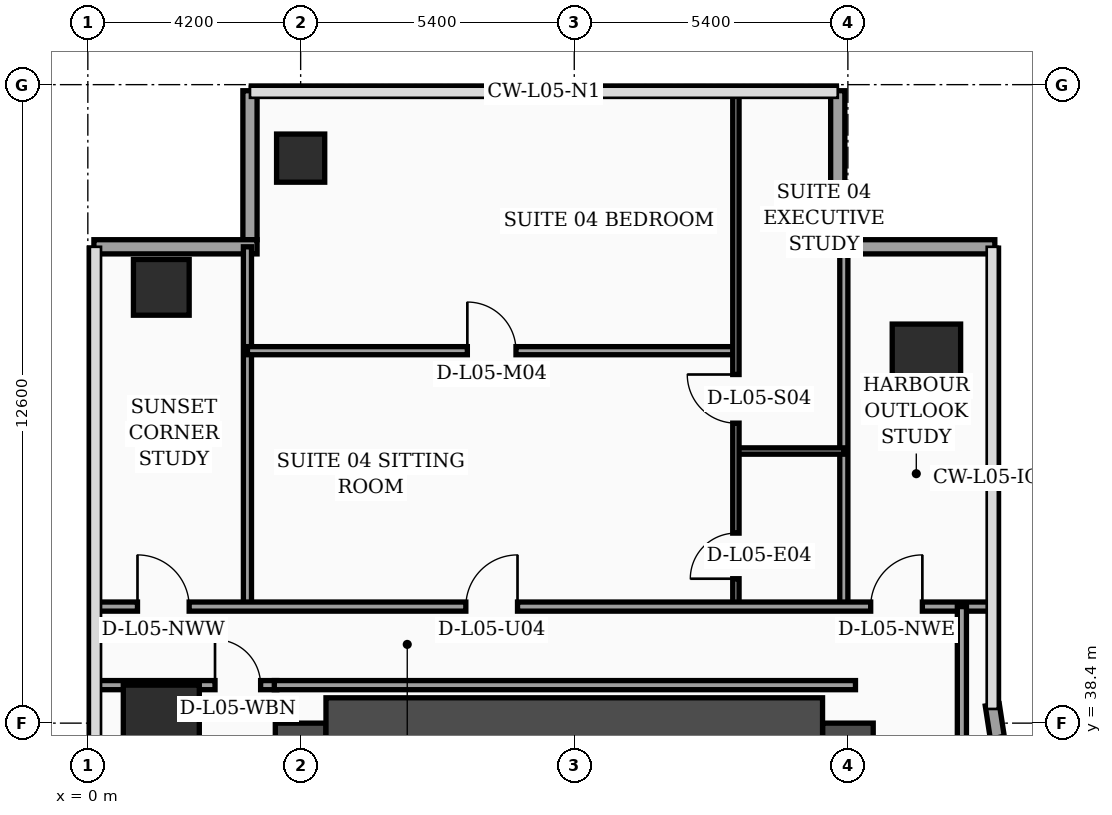
"""IFC4 building model, lengths in metres.
Left out: names, types, materials, properties, quantities, classifications, styles, units other than length and angle.
Written with IfcOpenShell. Run it as: python <this file> out.ifc"""

import sys

from ifc_helpers import new_model, si_unit, direction, frame, frame_2d, origin, origin_2d, place, context, subcontext, project, spatial, rectangle, hollow_rectangle, extrude, element, fill, save


model = new_model("IFC4")
c1 = context("Model", 3, precision=1e-05, world=origin(), true_north=direction((0.0, 1.0)))
c2 = subcontext(c1, "Body", "Model", "MODEL_VIEW")
j1 = project(units=[si_unit("LENGTHUNIT", "METRE"), si_unit("PLANEANGLEUNIT", "RADIAN")], contexts=[c1])
p1 = place(None, origin())
s1 = spatial("IfcSite", under=j1, at=p1, CompositionType="ELEMENT")
p2 = place(p1, origin())
s2 = spatial("IfcBuilding", under=s1, at=p2, CompositionType="ELEMENT")
p3 = place(p2, frame((0.0, 0.0, 27.0)))
s3 = spatial("IfcBuildingStorey", under=s2, at=p3, CompositionType="ELEMENT", Elevation=27.0)
p4 = place(p3, frame((4.2, 16.8, 0.0), z_axis=(0.0, 0.0, 1.0), x_axis=(0.0, 1.0, 0.0)))
e1 = element("IfcWall", 1, at=p4, inside=s3, PredefinedType="SHEAR", context=c2, shape_type="SweptSolid", body=[
    extrude(rectangle(XDim=21.6, YDim=1.0, at=frame_2d((10.8, 0.0))), origin(), (0.0, 0.0, 1.0), 3.56),
])
p5 = place(p3, frame((15.0, 16.8, 0.0), z_axis=(0.0, 0.0, 1.0), x_axis=(0.0, 1.0, 0.0)))
e2 = element("IfcWall", 2, at=p5, inside=s3, PredefinedType="SHEAR", context=c2, shape_type="SweptSolid", body=[
    extrude(rectangle(XDim=21.6, YDim=1.0, at=frame_2d((10.8, 0.0))), origin(), (0.0, 0.0, 1.0), 3.56),
])
p6 = place(p5, frame((8.65, 0.0, 0.0)))
e3 = element("IfcOpeningElement", 3, at=p6, cuts=e2, PredefinedType="OPENING", context=c2, shape_type="SweptSolid", body=[
    extrude(rectangle(XDim=1.1, YDim=2.2, at=frame_2d((0.55, 1.1))), frame((0.0, 0.51, 0.0), z_axis=(0.0, -1.0, 0.0), x_axis=(1.0, 0.0, 0.0)), (0.0, 0.0, 1.0), 1.02),
])
p7 = place(p5, frame((1.25, 0.0, 0.0)))
e4 = element("IfcOpeningElement", 4, at=p7, cuts=e2, PredefinedType="OPENING", context=c2, shape_type="SweptSolid", body=[
    extrude(rectangle(XDim=1.1, YDim=2.2, at=frame_2d((0.55, 1.1))), frame((0.0, 0.51, 0.0), z_axis=(0.0, -1.0, 0.0), x_axis=(1.0, 0.0, 0.0)), (0.0, 0.0, 1.0), 1.02),
])
p8 = place(p5, frame((3.8, 0.0, 0.0)))
e5 = element("IfcOpeningElement", 5, at=p8, cuts=e2, PredefinedType="OPENING", context=c2, shape_type="SweptSolid", body=[
    extrude(rectangle(XDim=1.1, YDim=2.2, at=frame_2d((0.55, 1.1))), frame((0.0, 0.51, 0.0), z_axis=(0.0, -1.0, 0.0), x_axis=(1.0, 0.0, 0.0)), (0.0, 0.0, 1.0), 1.02),
])
p9 = place(p5, frame((6.35, 0.0, 0.0)))
e6 = element("IfcOpeningElement", 6, at=p9, cuts=e2, PredefinedType="OPENING", context=c2, shape_type="SweptSolid", body=[
    extrude(rectangle(XDim=1.1, YDim=2.2, at=frame_2d((0.55, 1.1))), frame((0.0, 0.51, 0.0), z_axis=(0.0, -1.0, 0.0), x_axis=(1.0, 0.0, 0.0)), (0.0, 0.0, 1.0), 1.02),
])
p10 = place(p3, frame((4.7, 38.4, 0.0), z_axis=(0.0, 0.0, 1.0), x_axis=(1.0, 0.0, 0.0)))
e7 = element("IfcWall", 7, at=p10, inside=s3, PredefinedType="SHEAR", context=c2, shape_type="SweptSolid", body=[
    extrude(rectangle(XDim=9.8, YDim=1.0, at=frame_2d((4.9, 0.0))), origin(), (0.0, 0.0, 1.0), 3.56),
])
p11 = place(p3, frame((1.45, 38.4, 0.0), z_axis=(0.0, 0.0, 1.0), x_axis=(1.0, 0.0, 0.0)))
e8 = element("IfcColumn", 8, at=p11, inside=s3, PredefinedType="COLUMN", context=c2, shape_type="SweptSolid", body=[
    extrude(rectangle(XDim=1.5, YDim=1.5, at=origin_2d()), origin(), (0.0, 0.0, 1.0), 3.56),
])
p12 = place(p3, frame((1.45, 47.0, 0.0), z_axis=(0.0, 0.0, 1.0), x_axis=(1.0, 0.0, 0.0)))
e9 = element("IfcColumn", 9, at=p12, inside=s3, PredefinedType="COLUMN", context=c2, shape_type="SweptSolid", body=[
    extrude(hollow_rectangle(XDim=1.1, YDim=1.1, WallThickness=0.045, at=origin_2d()), origin(), (0.0, 0.0, 1.0), 3.56),
])
p13 = place(p3, frame((4.2, 49.55, 0.0), z_axis=(0.0, 0.0, 1.0), x_axis=(1.0, 0.0, 0.0)))
e10 = element("IfcColumn", 10, at=p13, inside=s3, PredefinedType="COLUMN", context=c2, shape_type="SweptSolid", body=[
    extrude(hollow_rectangle(XDim=0.95, YDim=0.95, WallThickness=0.04, at=origin_2d()), origin(), (0.0, 0.0, 1.0), 3.56),
])
p14 = place(p3, frame((16.55, 45.6, 0.0), z_axis=(0.0, 0.0, 1.0), x_axis=(1.0, 0.0, 0.0)))
e11 = element("IfcColumn", 11, at=p14, inside=s3, PredefinedType="COLUMN", context=c2, shape_type="SweptSolid", body=[
    extrude(rectangle(XDim=1.35, YDim=1.35, at=origin_2d()), origin(), (0.0, 0.0, 1.0), 3.56),
])
p15 = place(p3, frame((17.962, 38.03, 0.0), z_axis=(0.0, 0.0, 1.0), x_axis=(-0.15141125477, 0.988470855377, 0.0)))
e12 = element("IfcWall", 12, at=p15, inside=s3, PredefinedType="SOLIDWALL", context=c2, shape_type="SweptSolid", body=[
    extrude(rectangle(XDim=0.739, YDim=0.28, at=frame_2d((0.369, 0.0))), origin(), (0.0, 0.0, 1.0), 3.56),
])
p16 = place(p3, frame((17.9, 47.8, 0.0), z_axis=(0.0, 0.0, 1.0), x_axis=(-1.0, 0.0, 0.0)))
e13 = element("IfcWall", 13, at=p16, inside=s3, PredefinedType="SOLIDWALL", context=c2, shape_type="SweptSolid", body=[
    extrude(rectangle(XDim=3.24, YDim=0.28, at=frame_2d((1.62, 0.0))), origin(), (0.0, 0.0, 1.0), 3.56),
])
p17 = place(p3, frame((14.8, 47.94, 0.0), z_axis=(0.0, 0.0, 1.0), x_axis=(0.0, 1.0, 0.0)))
e14 = element("IfcWall", 14, at=p17, inside=s3, PredefinedType="SOLIDWALL", context=c2, shape_type="SweptSolid", body=[
    extrude(rectangle(XDim=2.94, YDim=0.28, at=frame_2d((1.47, 0.0))), origin(), (0.0, 0.0, 1.0), 3.56),
])
p18 = place(p3, frame((3.2, 50.88, 0.0), z_axis=(0.0, 0.0, 1.0), x_axis=(0.0, -1.0, 0.0)))
e15 = element("IfcWall", 15, at=p18, inside=s3, PredefinedType="SOLIDWALL", context=c2, shape_type="SweptSolid", body=[
    extrude(rectangle(XDim=2.94, YDim=0.28, at=frame_2d((1.47, 0.0))), origin(), (0.0, 0.0, 1.0), 3.04),
])
p19 = place(p3, frame((3.34, 47.8, 0.0), z_axis=(0.0, 0.0, 1.0), x_axis=(-1.0, 0.0, 0.0)))
e16 = element("IfcWall", 16, at=p19, inside=s3, PredefinedType="SOLIDWALL", context=c2, shape_type="SweptSolid", body=[
    extrude(rectangle(XDim=3.22, YDim=0.28, at=frame_2d((1.61, 0.0))), origin(), (0.0, 0.0, 1.0), 3.04),
])
p20 = place(p3, frame((0.08, 39.15, 0.0), z_axis=(0.0, 0.0, 1.0), x_axis=(1.0, 0.0, 0.0)))
e17 = element("IfcWall", 17, at=p20, inside=s3, PredefinedType="PARTITIONING", context=c2, shape_type="SweptSolid", body=[
    extrude(rectangle(XDim=3.65, YDim=0.18, at=frame_2d((1.825, 0.0))), origin(), (0.0, 0.0, 1.0), 2.84),
])
p21 = place(p20, frame((2.43, 0.0, 0.0)))
e18 = element("IfcOpeningElement", 18, at=p21, cuts=e17, PredefinedType="OPENING", context=c2, shape_type="SweptSolid", body=[
    extrude(rectangle(XDim=0.9, YDim=2.15, at=frame_2d((0.45, 1.075))), frame((0.0, 0.1, 0.0), z_axis=(0.0, -1.0, 0.0), x_axis=(1.0, 0.0, 0.0)), (0.0, 0.0, 1.0), 0.2),
])
p22 = place(p3, frame((3.15, 40.7, 0.0), z_axis=(0.0, 0.0, 1.0), x_axis=(0.0, 1.0, 0.0)))
e19 = element("IfcWall", 19, at=p22, inside=s3, PredefinedType="PARTITIONING", context=c2, shape_type="SweptSolid", body=[
    extrude(rectangle(XDim=7.1, YDim=0.16, at=frame_2d((3.55, 0.0))), origin(), (0.0, 0.0, 1.0), 3.14),
])
p23 = place(p3, frame((14.92, 40.7, 0.0), z_axis=(0.0, 0.0, 1.0), x_axis=(0.0, 1.0, 0.0)))
e20 = element("IfcWall", 20, at=p23, inside=s3, PredefinedType="PARTITIONING", context=c2, shape_type="SweptSolid", body=[
    extrude(rectangle(XDim=7.1, YDim=0.16, at=frame_2d((3.55, 0.0))), origin(), (0.0, 0.0, 1.0), 3.04),
])
p24 = place(p3, frame((12.79, 43.77, 0.0), z_axis=(0.0, 0.0, 1.0), x_axis=(1.0, 0.0, 0.0)))
e21 = element("IfcWall", 21, at=p24, inside=s3, PredefinedType="PARTITIONING", context=c2, shape_type="SweptSolid", body=[
    extrude(rectangle(XDim=2.13, YDim=0.125, at=frame_2d((1.065, 0.0))), origin(), (0.0, 0.0, 1.0), 3.56),
])
p25 = place(p3, frame((3.15, 45.75, 0.0), z_axis=(0.0, 0.0, 1.0), x_axis=(1.0, 0.0, 0.0)))
e22 = element("IfcWall", 22, at=p25, inside=s3, PredefinedType="PARTITIONING", context=c2, shape_type="SweptSolid", body=[
    extrude(rectangle(XDim=9.64, YDim=0.16, at=frame_2d((4.82, 0.0))), origin(), (0.0, 0.0, 1.0), 2.84),
])
p26 = place(p25, frame((4.34, 0.0, 0.0)))
e23 = element("IfcOpeningElement", 23, at=p26, cuts=e22, PredefinedType="OPENING", context=c2, shape_type="SweptSolid", body=[
    extrude(rectangle(XDim=0.96, YDim=2.2, at=frame_2d((0.48, 1.1))), frame((0.0, 0.09, 0.0), z_axis=(0.0, -1.0, 0.0), x_axis=(1.0, 0.0, 0.0)), (0.0, 0.0, 1.0), 0.18),
])
p27 = place(p3, frame((12.79, 40.7, 0.0), z_axis=(0.0, 0.0, 1.0), x_axis=(0.0, 1.0, 0.0)))
e24 = element("IfcWall", 24, at=p27, inside=s3, PredefinedType="PARTITIONING", context=c2, shape_type="SweptSolid", body=[
    extrude(rectangle(XDim=10.24, YDim=0.125, at=frame_2d((5.12, 0.0))), origin(), (0.0, 0.0, 1.0), 3.04),
])
p28 = place(p27, frame((0.55, 0.0, 0.0)))
e25 = element("IfcOpeningElement", 25, at=p28, cuts=e24, PredefinedType="OPENING", context=c2, shape_type="SweptSolid", body=[
    extrude(rectangle(XDim=0.9, YDim=2.15, at=frame_2d((0.45, 1.075))), frame((0.0, 0.073, 0.0), z_axis=(0.0, -1.0, 0.0), x_axis=(1.0, 0.0, 0.0)), (0.0, 0.0, 1.0), 0.145),
])
p29 = place(p27, frame((3.62, 0.0, 0.0)))
e26 = element("IfcOpeningElement", 26, at=p29, cuts=e24, PredefinedType="OPENING", context=c2, shape_type="SweptSolid", body=[
    extrude(rectangle(XDim=0.96, YDim=2.2, at=frame_2d((0.48, 1.1))), frame((0.0, 0.073, 0.0), z_axis=(0.0, -1.0, 0.0), x_axis=(1.0, 0.0, 0.0)), (0.0, 0.0, 1.0), 0.145),
])
p30 = place(p3, frame((0.08, 40.7, 0.0), z_axis=(0.0, 0.0, 1.0), x_axis=(1.0, 0.0, 0.0)))
e27 = element("IfcWall", 27, at=p30, inside=s3, PredefinedType="PARTITIONING", context=c2, shape_type="SweptSolid", body=[
    extrude(rectangle(XDim=17.77, YDim=0.18, at=frame_2d((8.885, 0.0))), origin(), (0.0, 0.0, 1.0), 2.84),
])
p31 = place(p30, frame((0.9, 0.0, 0.0)))
e28 = element("IfcOpeningElement", 28, at=p31, cuts=e27, PredefinedType="OPENING", context=c2, shape_type="SweptSolid", body=[
    extrude(rectangle(XDim=1.02, YDim=2.2, at=frame_2d((0.51, 1.1))), frame((0.0, 0.1, 0.0), z_axis=(0.0, -1.0, 0.0), x_axis=(1.0, 0.0, 0.0)), (0.0, 0.0, 1.0), 0.2),
])
p32 = place(p30, frame((7.38, 0.0, 0.0)))
e29 = element("IfcOpeningElement", 29, at=p32, cuts=e27, PredefinedType="OPENING", context=c2, shape_type="SweptSolid", body=[
    extrude(rectangle(XDim=1.02, YDim=2.2, at=frame_2d((0.51, 1.1))), frame((0.0, 0.1, 0.0), z_axis=(0.0, -1.0, 0.0), x_axis=(1.0, 0.0, 0.0)), (0.0, 0.0, 1.0), 0.2),
])
p33 = place(p30, frame((15.37, 0.0, 0.0)))
e30 = element("IfcOpeningElement", 30, at=p33, cuts=e27, PredefinedType="OPENING", context=c2, shape_type="SweptSolid", body=[
    extrude(rectangle(XDim=1.02, YDim=2.2, at=frame_2d((0.51, 1.1))), frame((0.0, 0.1, 0.0), z_axis=(0.0, -1.0, 0.0), x_axis=(1.0, 0.0, 0.0)), (0.0, 0.0, 1.0), 0.2),
])
p34 = place(p3, frame((17.25, 24.3, 0.0), z_axis=(0.0, 0.0, 1.0), x_axis=(0.0, 1.0, 0.0)))
e31 = element("IfcWall", 31, at=p34, inside=s3, PredefinedType="PARTITIONING", context=c2, shape_type="SweptSolid", body=[
    extrude(rectangle(XDim=16.4, YDim=0.18, at=frame_2d((8.2, 0.0))), origin(), (0.0, 0.0, 1.0), 2.84),
])
p35 = place(p3, frame((3.68, 39.15, 0.0), z_axis=(0.0, 0.0, 1.0), x_axis=(1.0, 0.0, 0.0)))
e32 = element("IfcWall", 32, at=p35, inside=s3, PredefinedType="PARTITIONING", context=c2, shape_type="SweptSolid", body=[
    extrude(rectangle(XDim=11.47, YDim=0.18, at=frame_2d((5.735, 0.0))), origin(), (0.0, 0.0, 1.0), 2.84),
])
p36 = place(p21, origin())
e33 = element("IfcDoor", 33, at=p36, inside=s3, OperationType="SINGLE_SWING_LEFT", PredefinedType="DOOR", context=c2, shape_type="SweptSolid", body=[
    extrude(rectangle(XDim=0.9, YDim=2.15, at=frame_2d((0.45, 1.075))), frame((0.0, 0.025, 0.0), z_axis=(0.0, -1.0, 0.0), x_axis=(1.0, 0.0, 0.0)), (0.0, 0.0, 1.0), 0.05),
])
fill(e18, e33)
p37 = place(p26, origin())
e34 = element("IfcDoor", 34, at=p37, inside=s3, OperationType="SINGLE_SWING_LEFT", PredefinedType="DOOR", context=c2, shape_type="SweptSolid", body=[
    extrude(rectangle(XDim=0.96, YDim=2.2, at=frame_2d((0.48, 1.1))), frame((0.0, 0.025, 0.0), z_axis=(0.0, -1.0, 0.0), x_axis=(1.0, 0.0, 0.0)), (0.0, 0.0, 1.0), 0.05),
])
fill(e23, e34)
p38 = place(p28, origin())
e35 = element("IfcDoor", 35, at=p38, inside=s3, OperationType="SINGLE_SWING_LEFT", PredefinedType="DOOR", context=c2, shape_type="SweptSolid", body=[
    extrude(rectangle(XDim=0.9, YDim=2.15, at=frame_2d((0.45, 1.075))), frame((0.0, 0.025, 0.0), z_axis=(0.0, -1.0, 0.0), x_axis=(1.0, 0.0, 0.0)), (0.0, 0.0, 1.0), 0.05),
])
fill(e25, e35)
p39 = place(p29, origin())
e36 = element("IfcDoor", 36, at=p39, inside=s3, OperationType="SINGLE_SWING_RIGHT", PredefinedType="DOOR", context=c2, shape_type="SweptSolid", body=[
    extrude(rectangle(XDim=0.96, YDim=2.2, at=frame_2d((0.48, 1.1))), frame((0.0, 0.025, 0.0), z_axis=(0.0, -1.0, 0.0), x_axis=(1.0, 0.0, 0.0)), (0.0, 0.0, 1.0), 0.05),
])
fill(e26, e36)
p40 = place(p31, origin())
e37 = element("IfcDoor", 37, at=p40, inside=s3, OperationType="SINGLE_SWING_LEFT", PredefinedType="DOOR", context=c2, shape_type="SweptSolid", body=[
    extrude(rectangle(XDim=1.02, YDim=2.2, at=frame_2d((0.51, 1.1))), frame((0.0, 0.025, 0.0), z_axis=(0.0, -1.0, 0.0), x_axis=(1.0, 0.0, 0.0)), (0.0, 0.0, 1.0), 0.05),
])
fill(e28, e37)
p41 = place(p32, origin())
e38 = element("IfcDoor", 38, at=p41, inside=s3, OperationType="SINGLE_SWING_RIGHT", PredefinedType="DOOR", context=c2, shape_type="SweptSolid", body=[
    extrude(rectangle(XDim=1.02, YDim=2.2, at=frame_2d((0.51, 1.1))), frame((0.0, 0.025, 0.0), z_axis=(0.0, -1.0, 0.0), x_axis=(1.0, 0.0, 0.0)), (0.0, 0.0, 1.0), 0.05),
])
fill(e29, e38)
p42 = place(p33, origin())
e39 = element("IfcDoor", 39, at=p42, inside=s3, OperationType="SINGLE_SWING_RIGHT", PredefinedType="DOOR", context=c2, shape_type="SweptSolid", body=[
    extrude(rectangle(XDim=1.02, YDim=2.2, at=frame_2d((0.51, 1.1))), frame((0.0, 0.025, 0.0), z_axis=(0.0, -1.0, 0.0), x_axis=(1.0, 0.0, 0.0)), (0.0, 0.0, 1.0), 0.05),
])
fill(e30, e39)
save(model, sys.argv[1])
